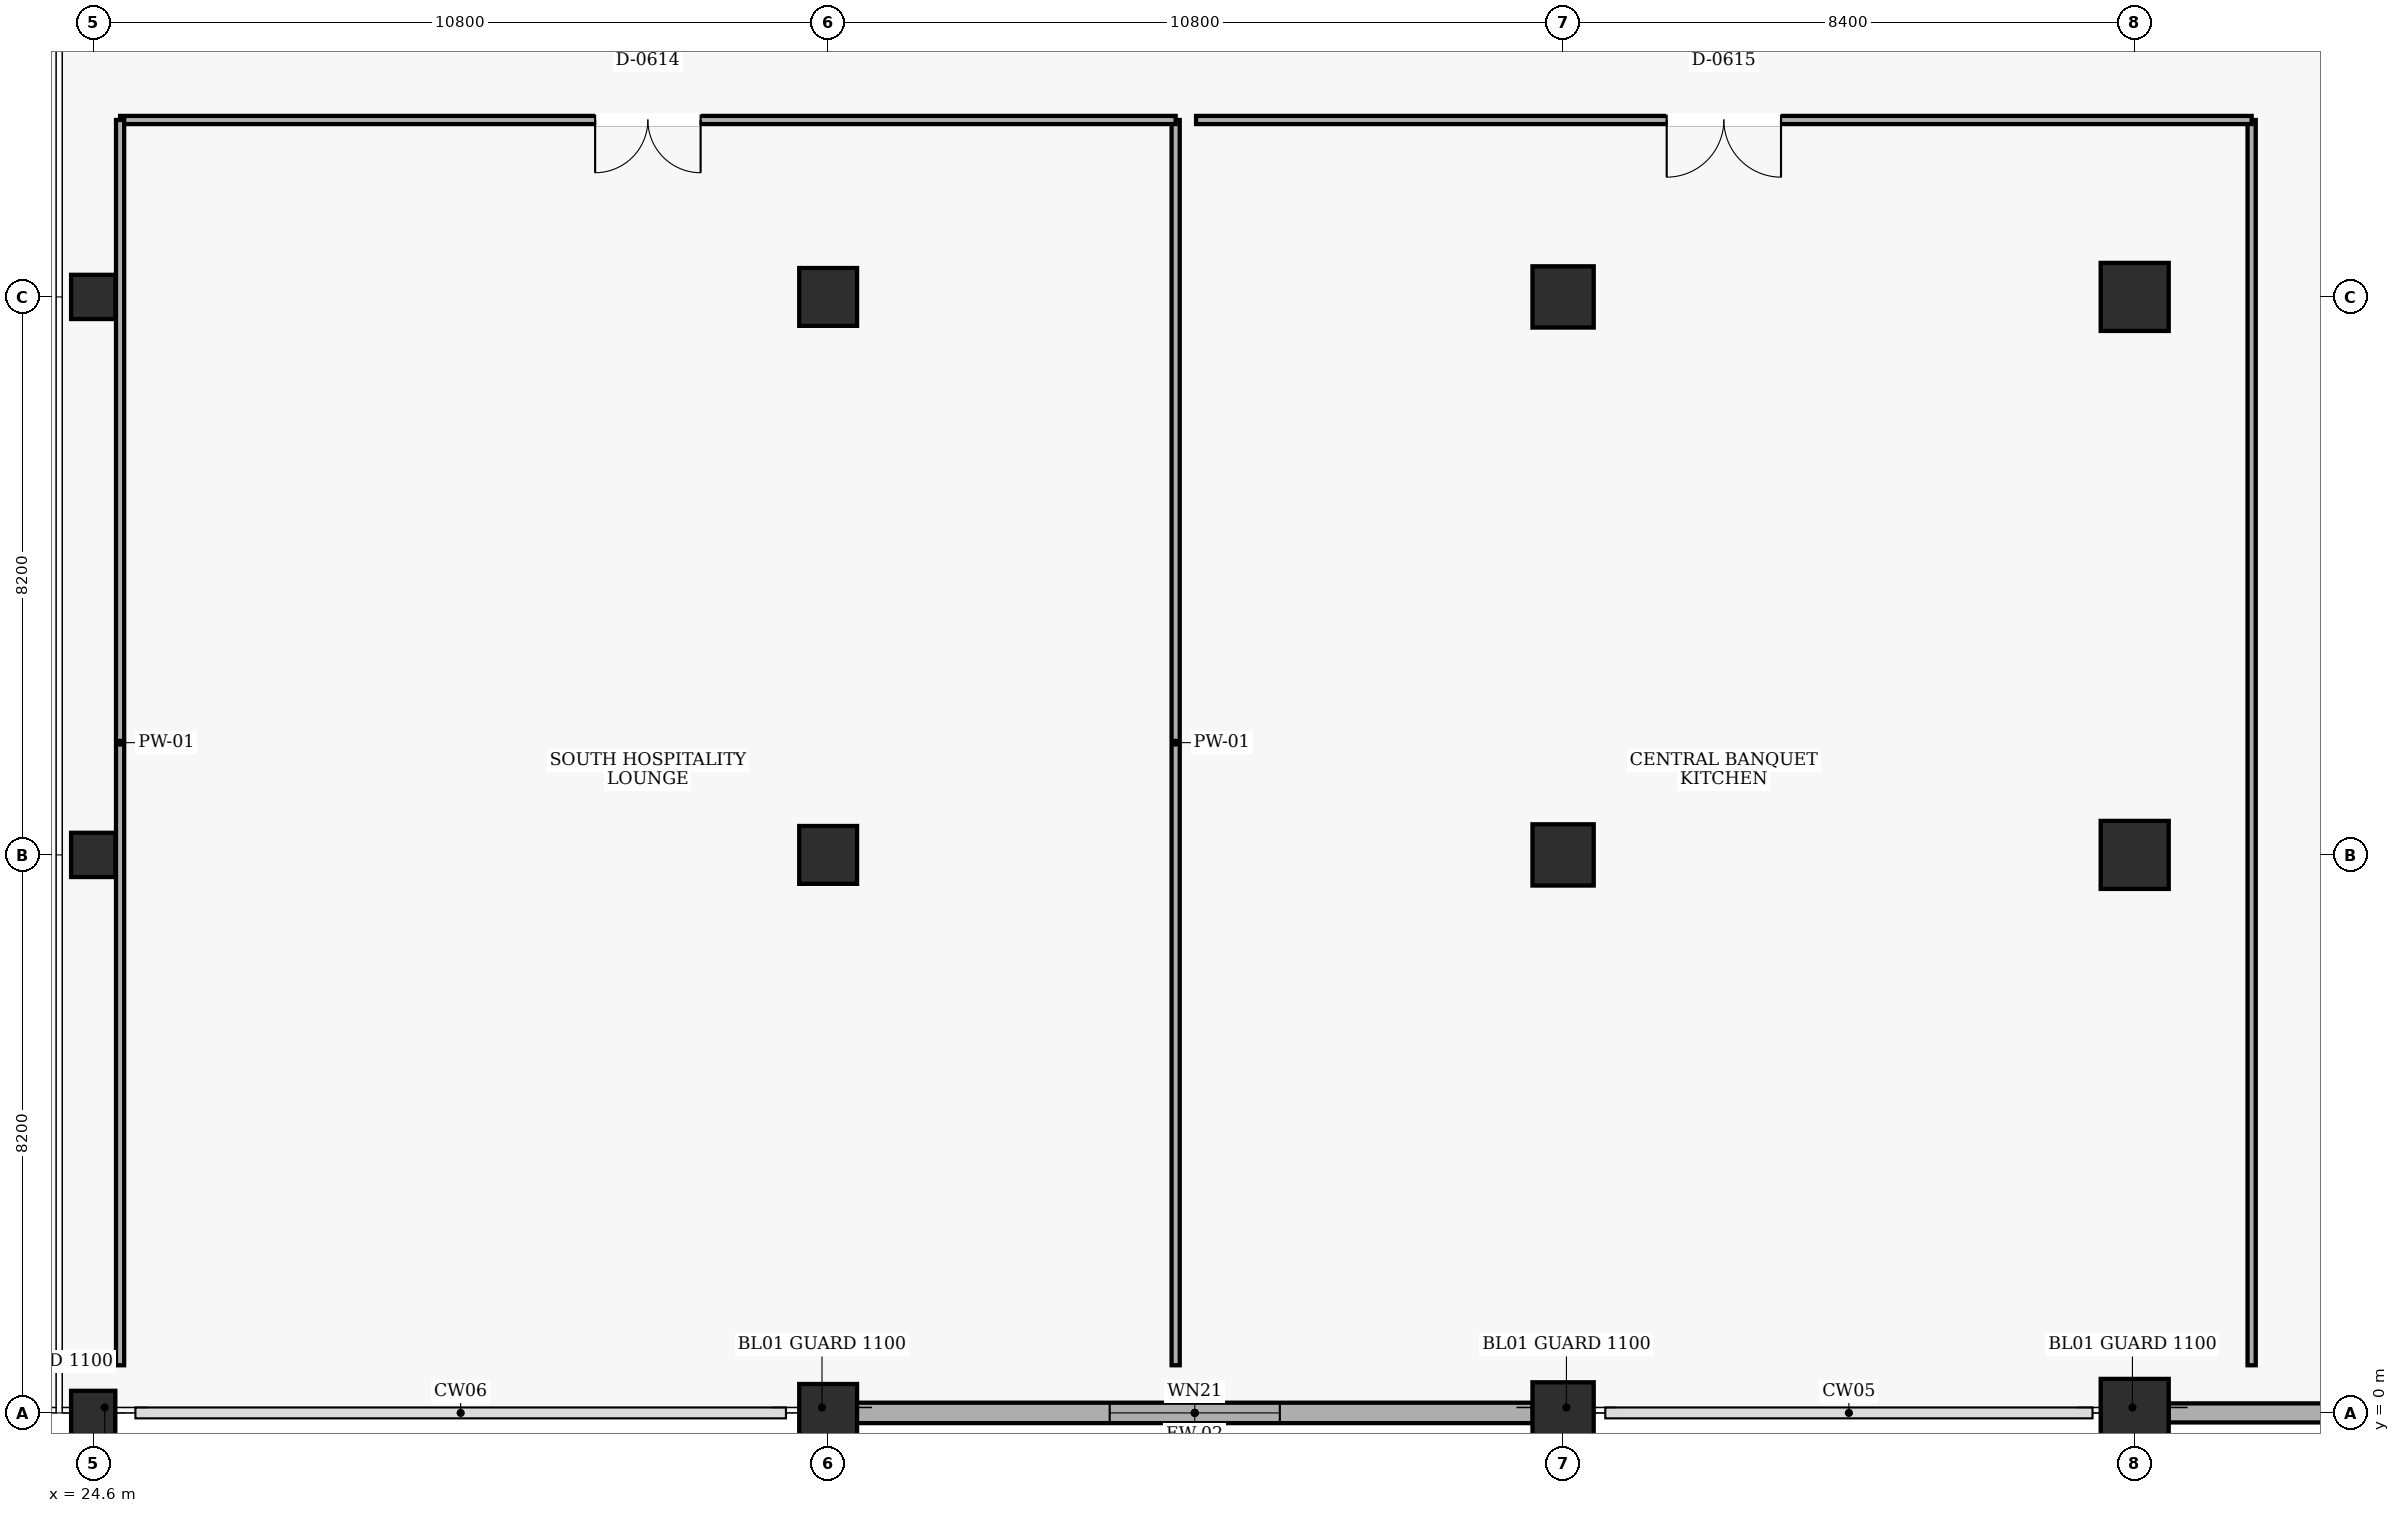
"""IFC4 building model, lengths in metres.
Left out: names, types, materials, properties, quantities, classifications, styles, units other than length and angle.
Written with IfcOpenShell. Run it as: python <this file> out.ifc"""

import sys

from ifc_helpers import new_model, si_unit, direction, frame, frame_2d, origin, origin_2d, place, context, subcontext, project, spatial, rectangle, extrude, element, fill, save


model = new_model("IFC4")
c1 = context("Model", 3, precision=1e-05, world=origin(), true_north=direction((0.0, 1.0)))
c2 = subcontext(c1, "Body", "Model", "MODEL_VIEW")
j1 = project(units=[si_unit("LENGTHUNIT", "METRE"), si_unit("PLANEANGLEUNIT", "RADIAN")], contexts=[c1])
p1 = place(None, origin())
s1 = spatial("IfcSite", under=j1, at=p1, CompositionType="ELEMENT")
p2 = place(p1, origin())
s2 = spatial("IfcBuilding", under=s1, at=p2, CompositionType="ELEMENT")
p3 = place(p2, frame((0.0, 0.0, 10.2)))
s3 = spatial("IfcBuildingStorey", under=s2, at=p3, CompositionType="ELEMENT", Elevation=10.2)
for number, where, z_axis, x_axis in (
    (1, (24.6, 0.0, 0.0), (0.0, 0.0, 1.0), (1.0, 0.0, 0.0)),
    (2, (24.6, 8.2, 0.0), (0.0, 0.0, 1.0), (1.0, 0.0, 0.0)),
    (3, (24.6, 16.4, 0.0), (0.0, 0.0, 1.0), (1.0, 0.0, 0.0)),
):
    element("IfcColumn", number, at=place(p3, frame(where, z_axis=z_axis, x_axis=x_axis)), inside=s3, PredefinedType="COLUMN", context=c2, shape_type="SweptSolid", body=[
        extrude(rectangle(XDim=0.65, YDim=0.65, at=origin_2d()), origin(), (0.0, 0.0, 1.0), 4.8),
    ])
for number, where, z_axis, x_axis in (
    (4, (35.4, 0.0, 0.0), (0.0, 0.0, 1.0), (1.0, 0.0, 0.0)),
    (5, (35.4, 8.2, 0.0), (0.0, 0.0, 1.0), (1.0, 0.0, 0.0)),
    (6, (35.4, 16.4, 0.0), (0.0, 0.0, 1.0), (1.0, 0.0, 0.0)),
):
    element("IfcColumn", number, at=place(p3, frame(where, z_axis=z_axis, x_axis=x_axis)), inside=s3, PredefinedType="COLUMN", context=c2, shape_type="SweptSolid", body=[
        extrude(rectangle(XDim=0.85, YDim=0.85, at=origin_2d()), origin(), (0.0, 0.0, 1.0), 4.8),
    ])
for number, where, z_axis, x_axis in (
    (7, (46.2, 0.0, 0.0), (0.0, 0.0, 1.0), (1.0, 0.0, 0.0)),
    (8, (46.2, 8.2, 0.0), (0.0, 0.0, 1.0), (1.0, 0.0, 0.0)),
    (9, (46.2, 16.4, 0.0), (0.0, 0.0, 1.0), (1.0, 0.0, 0.0)),
):
    element("IfcColumn", number, at=place(p3, frame(where, z_axis=z_axis, x_axis=x_axis)), inside=s3, PredefinedType="COLUMN", context=c2, shape_type="SweptSolid", body=[
        extrude(rectangle(XDim=0.9, YDim=0.9, at=origin_2d()), origin(), (0.0, 0.0, 1.0), 4.8),
    ])
for number, where, z_axis, x_axis in (
    (10, (54.6, 0.0, 0.0), (0.0, 0.0, 1.0), (1.0, 0.0, 0.0)),
    (11, (54.6, 8.2, 0.0), (0.0, 0.0, 1.0), (1.0, 0.0, 0.0)),
    (12, (54.6, 16.4, 0.0), (0.0, 0.0, 1.0), (1.0, 0.0, 0.0)),
):
    element("IfcColumn", number, at=place(p3, frame(where, z_axis=z_axis, x_axis=x_axis)), inside=s3, PredefinedType="COLUMN", context=c2, shape_type="SweptSolid", body=[
        extrude(rectangle(XDim=1.0, YDim=1.0, at=origin_2d()), origin(), (0.0, 0.0, 1.0), 4.8),
    ])
p4 = place(p3, frame((63.18, 0.0, 0.0), z_axis=(0.0, 0.0, 1.0), x_axis=(-1.0, 0.0, 0.0)))
e13 = element("IfcWall", 13, at=p4, inside=s3, PredefinedType="SOLIDWALL", context=c2, shape_type="SweptSolid", body=[
    extrude(rectangle(XDim=8.085, YDim=0.28, at=frame_2d((4.042, 0.0))), origin(), (0.0, 0.0, 1.0), 3.86),
])
p5 = place(p4, frame((3.042, 0.0, 0.9)))
e14 = element("IfcOpeningElement", 14, at=p5, cuts=e13, PredefinedType="OPENING", context=c2, shape_type="SweptSolid", body=[
    extrude(rectangle(XDim=2.0, YDim=2.4, at=frame_2d((1.0, 1.2))), frame((0.0, 0.15, 0.0), z_axis=(0.0, -1.0, 0.0), x_axis=(1.0, 0.0, 0.0)), (0.0, 0.0, 1.0), 0.3),
])
p6 = place(p3, frame((45.755, 0.0, 0.0), z_axis=(0.0, 0.0, 1.0), x_axis=(-1.0, 0.0, 0.0)))
e15 = element("IfcWall", 15, at=p6, inside=s3, PredefinedType="SOLIDWALL", context=c2, shape_type="SweptSolid", body=[
    extrude(rectangle(XDim=9.935, YDim=0.3, at=frame_2d((4.967, 0.0))), origin(), (0.0, 0.0, 1.0), 3.76),
])
p7 = place(p6, frame((3.718, 0.0, 0.9)))
e16 = element("IfcOpeningElement", 16, at=p7, cuts=e15, PredefinedType="OPENING", context=c2, shape_type="SweptSolid", body=[
    extrude(rectangle(XDim=2.5, YDim=2.4, at=frame_2d((1.25, 1.2))), frame((0.0, 0.16, 0.0), z_axis=(0.0, -1.0, 0.0), x_axis=(1.0, 0.0, 0.0)), (0.0, 0.0, 1.0), 0.32),
])
p8 = place(p3, frame((40.507, 0.7, 0.0), z_axis=(0.0, 0.0, 1.0), x_axis=(0.0, 1.0, 0.0)))
e17 = element("IfcWall", 17, at=p8, inside=s3, PredefinedType="PARTITIONING", context=c2, shape_type="SweptSolid", body=[
    extrude(rectangle(XDim=18.3, YDim=0.12, at=frame_2d((9.15, 0.0))), origin(), (0.0, 0.0, 1.0), 4.48),
])
p9 = place(p3, frame((40.507, 19.0, 0.0), z_axis=(0.0, 0.0, 1.0), x_axis=(-1.0, 0.0, 0.0)))
e18 = element("IfcWall", 18, at=p9, inside=s3, PredefinedType="PARTITIONING", context=c2, shape_type="SweptSolid", body=[
    extrude(rectangle(XDim=15.511, YDim=0.12, at=frame_2d((7.756, 0.0))), origin(), (0.0, 0.0, 1.0), 4.48),
])
p10 = place(p9, frame((6.981, 0.0, 0.0)))
e19 = element("IfcOpeningElement", 19, at=p10, cuts=e18, PredefinedType="OPENING", context=c2, shape_type="SweptSolid", body=[
    extrude(rectangle(XDim=1.55, YDim=2.2, at=frame_2d((0.775, 1.1))), frame((0.0, 0.07, 0.0), z_axis=(0.0, -1.0, 0.0), x_axis=(1.0, 0.0, 0.0)), (0.0, 0.0, 1.0), 0.14),
])
p11 = place(p3, frame((24.995, 19.0, 0.0), z_axis=(0.0, 0.0, 1.0), x_axis=(0.0, -1.0, 0.0)))
e20 = element("IfcWall", 20, at=p11, inside=s3, PredefinedType="PARTITIONING", context=c2, shape_type="SweptSolid", body=[
    extrude(rectangle(XDim=18.3, YDim=0.12, at=frame_2d((9.15, 0.0))), origin(), (0.0, 0.0, 1.0), 3.86),
])
p12 = place(p3, frame((56.318, 0.7, 0.0), z_axis=(0.0, 0.0, 1.0), x_axis=(0.0, 1.0, 0.0)))
e21 = element("IfcWall", 21, at=p12, inside=s3, PredefinedType="PARTITIONING", context=c2, shape_type="SweptSolid", body=[
    extrude(rectangle(XDim=18.3, YDim=0.12, at=frame_2d((9.15, 0.0))), origin(), (0.0, 0.0, 1.0), 4.48),
])
p13 = place(p3, frame((56.318, 19.0, 0.0), z_axis=(0.0, 0.0, 1.0), x_axis=(-1.0, 0.0, 0.0)))
e22 = element("IfcWall", 22, at=p13, inside=s3, PredefinedType="PARTITIONING", context=c2, shape_type="SweptSolid", body=[
    extrude(rectangle(XDim=15.512, YDim=0.12, at=frame_2d((7.756, 0.0))), origin(), (0.0, 0.0, 1.0), 4.48),
])
p14 = place(p13, frame((6.916, 0.0, 0.0)))
e23 = element("IfcOpeningElement", 23, at=p14, cuts=e22, PredefinedType="OPENING", context=c2, shape_type="SweptSolid", body=[
    extrude(rectangle(XDim=1.68, YDim=2.25, at=frame_2d((0.84, 1.125))), frame((0.0, 0.07, 0.0), z_axis=(0.0, -1.0, 0.0), x_axis=(1.0, 0.0, 0.0)), (0.0, 0.0, 1.0), 0.14),
])
p15 = place(p7, origin())
e24 = element("IfcWindow", 24, at=p15, inside=s3, PartitioningType="SINGLE_PANEL", PredefinedType="WINDOW", context=c2, shape_type="SweptSolid", body=[
    extrude(rectangle(XDim=2.5, YDim=2.4, at=frame_2d((1.25, 1.2))), frame((0.0, 0.03, 0.0), z_axis=(0.0, -1.0, 0.0), x_axis=(1.0, 0.0, 0.0)), (0.0, 0.0, 1.0), 0.06),
])
fill(e16, e24)
p16 = place(p10, origin())
e25 = element("IfcDoor", 25, at=p16, inside=s3, OperationType="DOUBLE_DOOR_SINGLE_SWING", PredefinedType="DOOR", context=c2, shape_type="SweptSolid", body=[
    extrude(rectangle(XDim=1.55, YDim=2.2, at=frame_2d((0.775, 1.1))), frame((0.0, 0.025, 0.0), z_axis=(0.0, -1.0, 0.0), x_axis=(1.0, 0.0, 0.0)), (0.0, 0.0, 1.0), 0.05),
])
fill(e19, e25)
p17 = place(p14, origin())
e26 = element("IfcDoor", 26, at=p17, inside=s3, OperationType="DOUBLE_DOOR_SINGLE_SWING", PredefinedType="DOOR", context=c2, shape_type="SweptSolid", body=[
    extrude(rectangle(XDim=1.68, YDim=2.25, at=frame_2d((0.84, 1.125))), frame((0.0, 0.025, 0.0), z_axis=(0.0, -1.0, 0.0), x_axis=(1.0, 0.0, 0.0)), (0.0, 0.0, 1.0), 0.05),
])
fill(e23, e26)
save(model, sys.argv[1])
